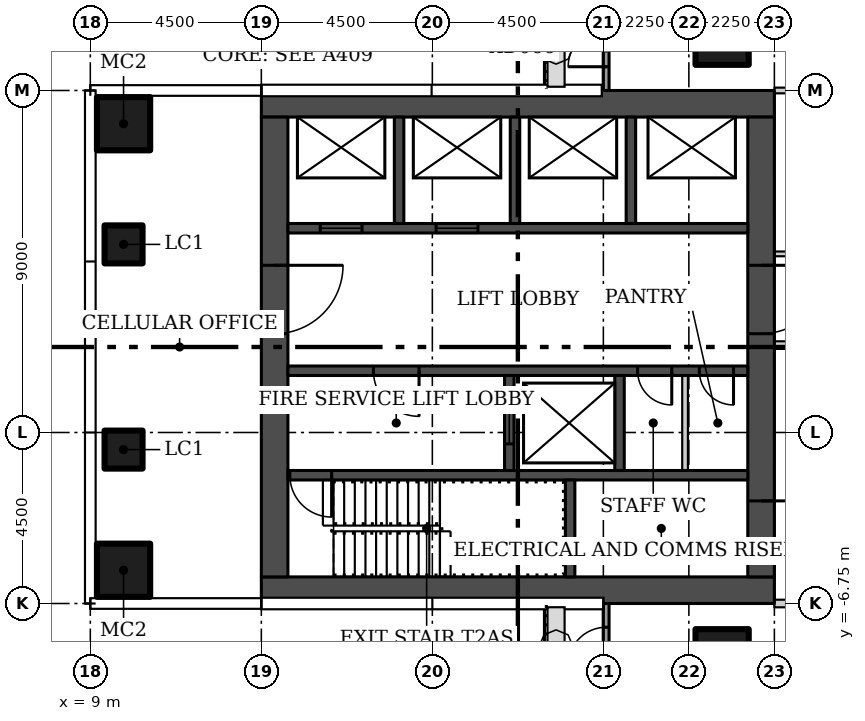
"""IFC4 building model, lengths in metres.
Left out: names, types, materials, properties, quantities, classifications, styles, units other than length and angle.
Written with IfcOpenShell. Run it as: python <this file> out.ifc"""

import sys

from ifc_helpers import new_model, si_unit, direction, frame, frame_2d, origin, origin_2d, place, context, subcontext, project, spatial, rectangle, hollow_rectangle, extrude, element, fill, save


model = new_model("IFC4")
c1 = context("Model", 3, precision=1e-05, world=origin(), true_north=direction((0.0, 1.0)))
c2 = subcontext(c1, "Body", "Model", "MODEL_VIEW")
j1 = project(units=[si_unit("LENGTHUNIT", "METRE"), si_unit("PLANEANGLEUNIT", "RADIAN")], contexts=[c1])
p1 = place(None, origin())
s1 = spatial("IfcSite", under=j1, at=p1, CompositionType="ELEMENT")
p2 = place(p1, origin())
s2 = spatial("IfcBuilding", under=s1, at=p2, CompositionType="ELEMENT")
p3 = place(p2, frame((0.0, 0.0, 53.7)))
s3 = spatial("IfcBuildingStorey", under=s2, at=p3, CompositionType="ELEMENT", Elevation=53.7)
for number, where in (
    (1, (25.625, 8.125, 0.0)),
    (2, (25.625, -8.125, 0.0)),
    (3, (9.875, -5.875, 0.0)),
    (4, (9.875, 5.875, 0.0)),
):
    element("IfcColumn", number, at=place(p3, frame(where)), inside=s3, PredefinedType="COLUMN", context=c2, shape_type="SweptSolid", body=[
        extrude(hollow_rectangle(XDim=1.4, YDim=1.4, WallThickness=0.05, at=origin_2d()), origin(), (0.0, 0.0, 1.0), 3.55),
    ])
for number, where in (
    (5, (9.875, -2.7, 0.0)),
    (6, (9.875, 2.7, 0.0)),
):
    element("IfcColumn", number, at=place(p3, frame(where)), inside=s3, PredefinedType="COLUMN", context=c2, shape_type="SweptSolid", body=[
        extrude(hollow_rectangle(XDim=1.0, YDim=1.0, WallThickness=0.04, at=origin_2d()), origin(), (0.0, 0.0, 1.0), 3.55),
    ])
p4 = place(p3, frame((27.0, 2.45, 0.0)))
e7 = element("IfcWall", 7, at=p4, inside=s3, PredefinedType="PARTITIONING", context=c2, shape_type="SweptSolid", body=[
    extrude(rectangle(XDim=5.312, YDim=0.125, at=frame_2d((2.656, 0.0))), origin(), (0.0, 0.0, 1.0), 3.55),
])
p5 = place(p4, frame((2.175, 0.0, 0.0)))
e8 = element("IfcOpeningElement", 8, at=p5, cuts=e7, PredefinedType="OPENING", context=c2, shape_type="SweptSolid", body=[
    extrude(rectangle(XDim=0.9, YDim=2.1, at=frame_2d((0.45, 1.05))), frame((0.0, 0.073, 0.0), z_axis=(0.0, -1.0, 0.0), x_axis=(1.0, 0.0, 0.0)), (0.0, 0.0, 1.0), 0.145),
])
p6 = place(p3, frame((37.6, 0.05, 0.0), z_axis=(0.0, 0.0, 1.0), x_axis=(-1.0, 0.0, 0.0)))
e9 = element("IfcWall", 9, at=p6, inside=s3, PredefinedType="PARTITIONING", context=c2, shape_type="SweptSolid", body=[
    extrude(rectangle(XDim=10.6, YDim=0.2, at=frame_2d((5.3, 0.0))), origin(), (0.0, 0.0, 1.0), 3.55),
])
p7 = place(p6, frame((4.9, 0.0, 0.0)))
e10 = element("IfcOpeningElement", 10, at=p7, cuts=e9, PredefinedType="OPENING", context=c2, shape_type="SweptSolid", body=[
    extrude(rectangle(XDim=0.9, YDim=2.1, at=frame_2d((0.45, 1.05))), frame((0.0, 0.11, 0.0), z_axis=(0.0, -1.0, 0.0), x_axis=(1.0, 0.0, 0.0)), (0.0, 0.0, 1.0), 0.22),
])
p8 = place(p3, frame((27.0, 6.75, 0.0)))
e11 = element("IfcWall", 11, at=p8, inside=s3, PredefinedType="PARTITIONING", context=c2, shape_type="SweptSolid", body=[
    extrude(rectangle(XDim=10.575, YDim=0.15, at=frame_2d((5.288, 0.0))), origin(), (0.0, 0.0, 1.0), 3.55),
])
p9 = place(p3, frame((37.6, -6.75, 0.0), z_axis=(0.0, 0.0, 1.0), x_axis=(-1.0, 0.0, 0.0)))
e12 = element("IfcWall", 12, at=p9, inside=s3, PredefinedType="PARTITIONING", context=c2, shape_type="SweptSolid", body=[
    extrude(rectangle(XDim=10.6, YDim=0.2, at=frame_2d((5.3, 0.0))), origin(), (0.0, 0.0, 1.0), 3.55),
])
p10 = place(p3, frame((22.575, 6.743, 0.0), z_axis=(0.0, 0.0, 1.0), x_axis=(0.0, 1.0, 0.0)))
e13 = element("IfcWall", 13, at=p10, inside=s3, PredefinedType="SOLIDWALL", context=c2, shape_type="SweptSolid", body=[
    extrude(rectangle(XDim=2.257, YDim=0.15, at=frame_2d((1.128, 0.0))), origin(), (0.0, 0.0, 1.0), 3.45),
])
p11 = place(p10, frame((0.632, 0.0, 0.0)))
e14 = element("IfcOpeningElement", 14, at=p11, cuts=e13, PredefinedType="OPENING", context=c2, shape_type="SweptSolid", body=[
    extrude(rectangle(XDim=1.0, YDim=2.4, at=frame_2d((0.5, 1.2))), frame((0.0, 0.085, 0.0), z_axis=(0.0, -1.0, 0.0), x_axis=(1.0, 0.0, 0.0)), (0.0, 0.0, 1.0), 0.17),
])
p12 = place(p3, frame((22.575, -9.0, 0.0), z_axis=(0.0, 0.0, 1.0), x_axis=(0.0, 1.0, 0.0)))
e15 = element("IfcWall", 15, at=p12, inside=s3, PredefinedType="SOLIDWALL", context=c2, shape_type="SweptSolid", body=[
    extrude(rectangle(XDim=2.257, YDim=0.15, at=frame_2d((1.128, 0.0))), origin(), (0.0, 0.0, 1.0), 3.45),
])
p13 = place(p12, frame((0.625, 0.0, 0.0)))
e16 = element("IfcOpeningElement", 16, at=p13, cuts=e15, PredefinedType="OPENING", context=c2, shape_type="SweptSolid", body=[
    extrude(rectangle(XDim=1.0, YDim=2.4, at=frame_2d((0.5, 1.2))), frame((0.0, 0.085, 0.0), z_axis=(0.0, -1.0, 0.0), x_axis=(1.0, 0.0, 0.0)), (0.0, 0.0, 1.0), 0.17),
])
for number, where in (
    (17, (13.5, -6.4, 0.0)),
    (18, (13.5, 6.4, 0.0)),
):
    element("IfcWall", number, at=place(p3, frame(where)), inside=s3, PredefinedType="SHEAR", context=c2, shape_type="SweptSolid", body=[
        extrude(rectangle(XDim=13.5, YDim=0.7, at=frame_2d((6.75, 0.0))), origin(), (0.0, 0.0, 1.0), 3.55),
    ])
p14 = place(p3, frame((13.85, 6.05, 0.0), z_axis=(0.0, 0.0, 1.0), x_axis=(0.0, -1.0, 0.0)))
e19 = element("IfcWall", 19, at=p14, inside=s3, PredefinedType="SHEAR", context=c2, shape_type="SweptSolid", body=[
    extrude(rectangle(XDim=12.1, YDim=0.7, at=frame_2d((6.05, 0.0))), origin(), (0.0, 0.0, 1.0), 3.55),
])
p15 = place(p14, frame((3.9, 0.0, 0.0)))
e20 = element("IfcOpeningElement", 20, at=p15, cuts=e19, PredefinedType="OPENING", context=c2, shape_type="SweptSolid", body=[
    extrude(rectangle(XDim=1.8, YDim=2.4, at=frame_2d((0.9, 1.2))), frame((0.0, 0.36, 0.0), z_axis=(0.0, -1.0, 0.0), x_axis=(1.0, 0.0, 0.0)), (0.0, 0.0, 1.0), 0.72),
])
p16 = place(p3, frame((26.65, 6.05, 0.0), z_axis=(0.0, 0.0, 1.0), x_axis=(0.0, -1.0, 0.0)))
e21 = element("IfcWall", 21, at=p16, inside=s3, PredefinedType="SHEAR", context=c2, shape_type="SweptSolid", body=[
    extrude(rectangle(XDim=12.1, YDim=0.7, at=frame_2d((6.05, 0.0))), origin(), (0.0, 0.0, 1.0), 3.55),
])
p17 = place(p16, frame((10.1, 0.0, 0.0)))
e22 = element("IfcOpeningElement", 22, at=p17, cuts=e21, PredefinedType="OPENING", context=c2, shape_type="SweptSolid", body=[
    extrude(rectangle(XDim=1.2, YDim=2.1, at=frame_2d((0.6, 1.05))), frame((0.0, 0.36, 0.0), z_axis=(0.0, -1.0, 0.0), x_axis=(1.0, 0.0, 0.0)), (0.0, 0.0, 1.0), 0.72),
])
p18 = place(p16, frame((3.9, 0.0, 0.0)))
e23 = element("IfcOpeningElement", 23, at=p18, cuts=e21, PredefinedType="OPENING", context=c2, shape_type="SweptSolid", body=[
    extrude(rectangle(XDim=1.8, YDim=2.4, at=frame_2d((0.9, 1.2))), frame((0.0, 0.36, 0.0), z_axis=(0.0, -1.0, 0.0), x_axis=(1.0, 0.0, 0.0)), (0.0, 0.0, 1.0), 0.72),
])
p19 = place(p3, frame((26.3, -3.375, 0.0), z_axis=(0.0, 0.0, 1.0), x_axis=(-1.0, 0.0, 0.0)))
e24 = element("IfcWall", 24, at=p19, inside=s3, PredefinedType="SHEAR", context=c2, shape_type="SweptSolid", body=[
    extrude(rectangle(XDim=12.1, YDim=0.25, at=frame_2d((6.05, 0.0))), origin(), (0.0, 0.0, 1.0), 3.55),
])
p20 = place(p19, frame((10.95, 0.0, 0.0)))
e25 = element("IfcOpeningElement", 25, at=p20, cuts=e24, PredefinedType="OPENING", context=c2, shape_type="SweptSolid", body=[
    extrude(rectangle(XDim=1.1, YDim=2.1, at=frame_2d((0.55, 1.05))), frame((0.0, 0.135, 0.0), z_axis=(0.0, -1.0, 0.0), x_axis=(1.0, 0.0, 0.0)), (0.0, 0.0, 1.0), 0.27),
])
p21 = place(p3, frame((21.625, -6.05, 0.0), z_axis=(0.0, 0.0, 1.0), x_axis=(0.0, 1.0, 0.0)))
e26 = element("IfcWall", 26, at=p21, inside=s3, PredefinedType="SHEAR", context=c2, shape_type="SweptSolid", body=[
    extrude(rectangle(XDim=2.55, YDim=0.25, at=frame_2d((1.275, 0.0))), origin(), (0.0, 0.0, 1.0), 3.55),
])
p22 = place(p3, frame((26.3, -0.625, 0.0), z_axis=(0.0, 0.0, 1.0), x_axis=(-1.0, 0.0, 0.0)))
e27 = element("IfcWall", 27, at=p22, inside=s3, PredefinedType="SHEAR", context=c2, shape_type="SweptSolid", body=[
    extrude(rectangle(XDim=12.1, YDim=0.25, at=frame_2d((6.05, 0.0))), origin(), (0.0, 0.0, 1.0), 3.55),
])
p23 = place(p22, frame((8.65, 0.0, 0.0)))
e28 = element("IfcOpeningElement", 28, at=p23, cuts=e27, PredefinedType="OPENING", context=c2, shape_type="SweptSolid", body=[
    extrude(rectangle(XDim=1.2, YDim=2.1, at=frame_2d((0.6, 1.05))), frame((0.0, 0.135, 0.0), z_axis=(0.0, -1.0, 0.0), x_axis=(1.0, 0.0, 0.0)), (0.0, 0.0, 1.0), 0.27),
])
p24 = place(p22, frame((2.0, 0.0, 0.0)))
e29 = element("IfcOpeningElement", 29, at=p24, cuts=e27, PredefinedType="OPENING", context=c2, shape_type="SweptSolid", body=[
    extrude(rectangle(XDim=0.9, YDim=2.1, at=frame_2d((0.45, 1.05))), frame((0.0, 0.135, 0.0), z_axis=(0.0, -1.0, 0.0), x_axis=(1.0, 0.0, 0.0)), (0.0, 0.0, 1.0), 0.27),
])
p25 = place(p22, frame((0.375, 0.0, 0.0)))
e30 = element("IfcOpeningElement", 30, at=p25, cuts=e27, PredefinedType="OPENING", context=c2, shape_type="SweptSolid", body=[
    extrude(rectangle(XDim=0.9, YDim=2.1, at=frame_2d((0.45, 1.05))), frame((0.0, 0.135, 0.0), z_axis=(0.0, -1.0, 0.0), x_axis=(1.0, 0.0, 0.0)), (0.0, 0.0, 1.0), 0.27),
])
p26 = place(p3, frame((20.025, -3.25, 0.0), z_axis=(0.0, 0.0, 1.0), x_axis=(0.0, 1.0, 0.0)))
e31 = element("IfcWall", 31, at=p26, inside=s3, PredefinedType="SHEAR", context=c2, shape_type="SweptSolid", body=[
    extrude(rectangle(XDim=2.5, YDim=0.25, at=frame_2d((1.25, 0.0))), origin(), (0.0, 0.0, 1.0), 3.55),
])
p27 = place(p26, frame((0.7, 0.0, 0.0)))
e32 = element("IfcOpeningElement", 32, at=p27, cuts=e31, PredefinedType="OPENING", context=c2, shape_type="SweptSolid", body=[
    extrude(rectangle(XDim=1.1, YDim=2.1, at=frame_2d((0.55, 1.05))), frame((0.0, 0.135, 0.0), z_axis=(0.0, -1.0, 0.0), x_axis=(1.0, 0.0, 0.0)), (0.0, 0.0, 1.0), 0.27),
])
p28 = place(p3, frame((22.925, -3.25, 0.0), z_axis=(0.0, 0.0, 1.0), x_axis=(0.0, 1.0, 0.0)))
e33 = element("IfcWall", 33, at=p28, inside=s3, PredefinedType="SHEAR", context=c2, shape_type="SweptSolid", body=[
    extrude(rectangle(XDim=2.5, YDim=0.25, at=frame_2d((1.25, 0.0))), origin(), (0.0, 0.0, 1.0), 3.55),
])
p29 = place(p3, frame((24.65, -3.25, 0.0), z_axis=(0.0, 0.0, 1.0), x_axis=(0.0, 1.0, 0.0)))
e34 = element("IfcWall", 34, at=p29, inside=s3, PredefinedType="PARTITIONING", context=c2, shape_type="SweptSolid", body=[
    extrude(rectangle(XDim=2.5, YDim=0.15, at=frame_2d((1.25, 0.0))), origin(), (0.0, 0.0, 1.0), 3.55),
])
p30 = place(p3, frame((14.2, 3.125, 0.0)))
e35 = element("IfcWall", 35, at=p30, inside=s3, PredefinedType="SHEAR", context=c2, shape_type="SweptSolid", body=[
    extrude(rectangle(XDim=12.1, YDim=0.25, at=frame_2d((6.05, 0.0))), origin(), (0.0, 0.0, 1.0), 3.55),
])
p31 = place(p30, frame((0.85, 0.0, 0.0)))
e36 = element("IfcOpeningElement", 36, at=p31, cuts=e35, PredefinedType="OPENING", context=c2, shape_type="SweptSolid", body=[
    extrude(rectangle(XDim=1.1, YDim=2.1, at=frame_2d((0.55, 1.05))), frame((0.0, 0.135, 0.0), z_axis=(0.0, -1.0, 0.0), x_axis=(1.0, 0.0, 0.0)), (0.0, 0.0, 1.0), 0.27),
])
p32 = place(p30, frame((3.9, 0.0, 0.0)))
e37 = element("IfcOpeningElement", 37, at=p32, cuts=e35, PredefinedType="OPENING", context=c2, shape_type="SweptSolid", body=[
    extrude(rectangle(XDim=1.1, YDim=2.1, at=frame_2d((0.55, 1.05))), frame((0.0, 0.135, 0.0), z_axis=(0.0, -1.0, 0.0), x_axis=(1.0, 0.0, 0.0)), (0.0, 0.0, 1.0), 0.27),
])
for number, where, z_axis, x_axis in (
    (38, (17.125, 3.25, 0.0), (0.0, 0.0, 1.0), (0.0, 1.0, 0.0)),
    (39, (20.175, 3.25, 0.0), (0.0, 0.0, 1.0), (0.0, 1.0, 0.0)),
    (40, (23.225, 3.25, 0.0), (0.0, 0.0, 1.0), (0.0, 1.0, 0.0)),
):
    element("IfcWall", number, at=place(p3, frame(where, z_axis=z_axis, x_axis=x_axis)), inside=s3, PredefinedType="SHEAR", context=c2, shape_type="SweptSolid", body=[
        extrude(rectangle(XDim=2.8, YDim=0.25, at=frame_2d((1.4, 0.0))), origin(), (0.0, 0.0, 1.0), 3.55),
    ])
p33 = place(p11, origin())
e41 = element("IfcDoor", 41, at=p33, inside=s3, OperationType="SINGLE_SWING_LEFT", PredefinedType="DOOR", context=c2, shape_type="SweptSolid", body=[
    extrude(rectangle(XDim=1.0, YDim=2.4, at=frame_2d((0.5, 1.2))), frame((0.0, 0.025, 0.0), z_axis=(0.0, -1.0, 0.0), x_axis=(1.0, 0.0, 0.0)), (0.0, 0.0, 1.0), 0.05),
])
fill(e14, e41)
p34 = place(p13, origin())
e42 = element("IfcDoor", 42, at=p34, inside=s3, OperationType="SINGLE_SWING_LEFT", PredefinedType="DOOR", context=c2, shape_type="SweptSolid", body=[
    extrude(rectangle(XDim=1.0, YDim=2.4, at=frame_2d((0.5, 1.2))), frame((0.0, 0.025, 0.0), z_axis=(0.0, -1.0, 0.0), x_axis=(1.0, 0.0, 0.0)), (0.0, 0.0, 1.0), 0.05),
])
fill(e16, e42)
p35 = place(p15, origin())
e43 = element("IfcDoor", 43, at=p35, inside=s3, OperationType="DOUBLE_DOOR_SINGLE_SWING", PredefinedType="DOOR", context=c2, shape_type="SweptSolid", body=[
    extrude(rectangle(XDim=1.8, YDim=2.4, at=frame_2d((0.9, 1.2))), frame((0.0, 0.025, 0.0), z_axis=(0.0, -1.0, 0.0), x_axis=(1.0, 0.0, 0.0)), (0.0, 0.0, 1.0), 0.05),
])
fill(e20, e43)
p36 = place(p17, origin())
e44 = element("IfcDoor", 44, at=p36, inside=s3, OperationType="SINGLE_SWING_RIGHT", PredefinedType="DOOR", context=c2, shape_type="SweptSolid", body=[
    extrude(rectangle(XDim=1.2, YDim=2.1, at=frame_2d((0.6, 1.05))), frame((0.0, 0.025, 0.0), z_axis=(0.0, -1.0, 0.0), x_axis=(1.0, 0.0, 0.0)), (0.0, 0.0, 1.0), 0.05),
])
fill(e22, e44)
p37 = place(p18, origin())
e45 = element("IfcDoor", 45, at=p37, inside=s3, OperationType="DOUBLE_DOOR_SINGLE_SWING", PredefinedType="DOOR", context=c2, shape_type="SweptSolid", body=[
    extrude(rectangle(XDim=1.8, YDim=2.4, at=frame_2d((0.9, 1.2))), frame((0.0, 0.025, 0.0), z_axis=(0.0, -1.0, 0.0), x_axis=(1.0, 0.0, 0.0)), (0.0, 0.0, 1.0), 0.05),
])
fill(e23, e45)
p38 = place(p20, origin())
e46 = element("IfcDoor", 46, at=p38, inside=s3, OperationType="SINGLE_SWING_RIGHT", PredefinedType="DOOR", context=c2, shape_type="SweptSolid", body=[
    extrude(rectangle(XDim=1.1, YDim=2.1, at=frame_2d((0.55, 1.05))), frame((0.0, 0.025, 0.0), z_axis=(0.0, -1.0, 0.0), x_axis=(1.0, 0.0, 0.0)), (0.0, 0.0, 1.0), 0.05),
])
fill(e25, e46)
p39 = place(p23, origin())
e47 = element("IfcDoor", 47, at=p39, inside=s3, OperationType="SINGLE_SWING_RIGHT", PredefinedType="DOOR", context=c2, shape_type="SweptSolid", body=[
    extrude(rectangle(XDim=1.2, YDim=2.1, at=frame_2d((0.6, 1.05))), frame((0.0, 0.025, 0.0), z_axis=(0.0, -1.0, 0.0), x_axis=(1.0, 0.0, 0.0)), (0.0, 0.0, 1.0), 0.05),
])
fill(e28, e47)
p40 = place(p24, origin())
e48 = element("IfcDoor", 48, at=p40, inside=s3, OperationType="SINGLE_SWING_LEFT", PredefinedType="DOOR", context=c2, shape_type="SweptSolid", body=[
    extrude(rectangle(XDim=0.9, YDim=2.1, at=frame_2d((0.45, 1.05))), frame((0.0, 0.025, 0.0), z_axis=(0.0, -1.0, 0.0), x_axis=(1.0, 0.0, 0.0)), (0.0, 0.0, 1.0), 0.05),
])
fill(e29, e48)
p41 = place(p25, origin())
e49 = element("IfcDoor", 49, at=p41, inside=s3, OperationType="SINGLE_SWING_LEFT", PredefinedType="DOOR", context=c2, shape_type="SweptSolid", body=[
    extrude(rectangle(XDim=0.9, YDim=2.1, at=frame_2d((0.45, 1.05))), frame((0.0, 0.025, 0.0), z_axis=(0.0, -1.0, 0.0), x_axis=(1.0, 0.0, 0.0)), (0.0, 0.0, 1.0), 0.05),
])
fill(e30, e49)
p42 = place(p27, origin())
e50 = element("IfcDoor", 50, at=p42, inside=s3, OperationType="SLIDING_TO_LEFT", PredefinedType="DOOR", context=c2, shape_type="SweptSolid", body=[
    extrude(rectangle(XDim=1.1, YDim=2.1, at=frame_2d((0.55, 1.05))), frame((0.0, 0.025, 0.0), z_axis=(0.0, -1.0, 0.0), x_axis=(1.0, 0.0, 0.0)), (0.0, 0.0, 1.0), 0.05),
])
fill(e32, e50)
p43 = place(p31, origin())
e51 = element("IfcDoor", 51, at=p43, inside=s3, OperationType="SLIDING_TO_LEFT", PredefinedType="DOOR", context=c2, shape_type="SweptSolid", body=[
    extrude(rectangle(XDim=1.1, YDim=2.1, at=frame_2d((0.55, 1.05))), frame((0.0, 0.025, 0.0), z_axis=(0.0, -1.0, 0.0), x_axis=(1.0, 0.0, 0.0)), (0.0, 0.0, 1.0), 0.05),
])
fill(e36, e51)
p44 = place(p32, origin())
e52 = element("IfcDoor", 52, at=p44, inside=s3, OperationType="SLIDING_TO_LEFT", PredefinedType="DOOR", context=c2, shape_type="SweptSolid", body=[
    extrude(rectangle(XDim=1.1, YDim=2.1, at=frame_2d((0.55, 1.05))), frame((0.0, 0.025, 0.0), z_axis=(0.0, -1.0, 0.0), x_axis=(1.0, 0.0, 0.0)), (0.0, 0.0, 1.0), 0.05),
])
fill(e37, e52)
save(model, sys.argv[1])
